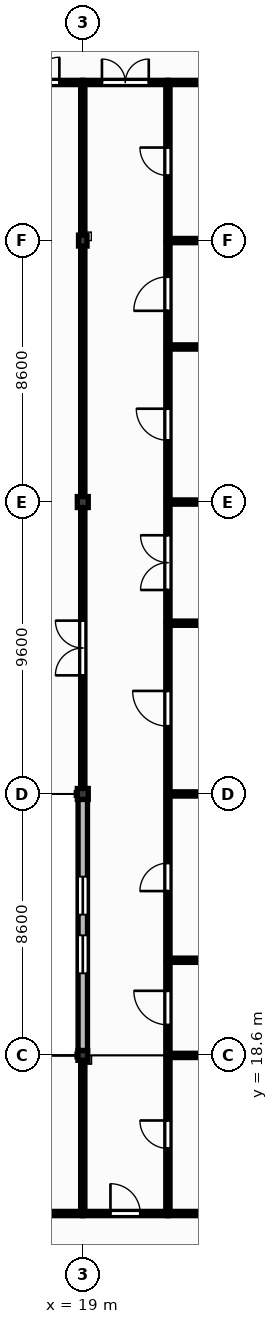
"""IFC4 building model, lengths in metres.
Left out: names, types, materials, properties, quantities, classifications, styles, units other than length and angle.
Written with IfcOpenShell. Run it as: python <this file> out.ifc"""

import sys

from ifc_helpers import new_model, si_unit, direction, frame, frame_2d, origin, origin_2d, place, context, subcontext, project, spatial, rectangle, extrude, element, fill, save


model = new_model("IFC4")
c1 = context("Model", 3, precision=1e-05, world=origin(), true_north=direction((0.0, 1.0)))
c2 = subcontext(c1, "Body", "Model", "MODEL_VIEW")
j1 = project(units=[si_unit("LENGTHUNIT", "METRE"), si_unit("PLANEANGLEUNIT", "RADIAN")], contexts=[c1])
p1 = place(None, origin())
s1 = spatial("IfcSite", under=j1, at=p1, CompositionType="ELEMENT")
p2 = place(p1, origin())
s2 = spatial("IfcBuilding", under=s1, at=p2, CompositionType="ELEMENT")
p3 = place(p2, frame((0.0, 0.0, 9.0)))
s3 = spatial("IfcBuildingStorey", under=s2, at=p3, CompositionType="ELEMENT", Elevation=9.0)
p4 = place(p3, frame((19.0, 18.6, 0.0), z_axis=(0.0, 0.0, 1.0), x_axis=(1.0, 0.0, 0.0)))
e1 = element("IfcColumn", 1, at=p4, inside=s3, PredefinedType="COLUMN", context=c2, shape_type="SweptSolid", body=[
    extrude(rectangle(XDim=0.32, YDim=0.32, at=origin_2d()), origin(), (0.0, 0.0, 1.0), 3.95),
])
for number, where, z_axis, x_axis in (
    (2, (19.0, 27.2, 0.0), (0.0, 0.0, 1.0), (1.0, 0.0, 0.0)),
    (3, (19.0, 36.8, 0.0), (0.0, 0.0, 1.0), (1.0, 0.0, 0.0)),
):
    element("IfcColumn", number, at=place(p3, frame(where, z_axis=z_axis, x_axis=x_axis)), inside=s3, PredefinedType="COLUMN", context=c2, shape_type="SweptSolid", body=[
        extrude(rectangle(XDim=0.36, YDim=0.36, at=origin_2d()), origin(), (0.0, 0.0, 1.0), 3.95),
    ])
p5 = place(p3, frame((19.0, 45.4, 0.0), z_axis=(0.0, 0.0, 1.0), x_axis=(1.0, 0.0, 0.0)))
e4 = element("IfcColumn", 4, at=p5, inside=s3, PredefinedType="COLUMN", context=c2, shape_type="SweptSolid", body=[
    extrude(rectangle(XDim=0.28, YDim=0.36, at=origin_2d()), origin(), (0.0, 0.0, 1.0), 3.95),
])
p6 = place(p3, frame((19.0, 18.76, 0.0), z_axis=(0.0, 0.0, 1.0), x_axis=(0.0, 1.0, 0.0)))
e5 = element("IfcWall", 5, at=p6, inside=s3, PredefinedType="SOLIDWALL", context=c2, shape_type="SweptSolid", body=[
    extrude(rectangle(XDim=8.26, YDim=0.31, at=frame_2d((4.13, 0.0))), origin(), (0.0, 0.0, 1.0), 3.49),
])
p7 = place(p6, frame((2.54, 0.0, 1.35)))
e6 = element("IfcOpeningElement", 6, at=p7, cuts=e5, PredefinedType="OPENING", context=c2, shape_type="SweptSolid", body=[
    extrude(rectangle(XDim=1.25, YDim=1.4, at=frame_2d((0.625, 0.7))), frame((0.0, 0.165, 0.0), z_axis=(0.0, -1.0, 0.0), x_axis=(1.0, 0.0, 0.0)), (0.0, 0.0, 1.0), 0.33),
])
p8 = place(p6, frame((4.47, 0.0, 1.35)))
e7 = element("IfcOpeningElement", 7, at=p8, cuts=e5, PredefinedType="OPENING", context=c2, shape_type="SweptSolid", body=[
    extrude(rectangle(XDim=1.25, YDim=1.4, at=frame_2d((0.625, 0.7))), frame((0.0, 0.165, 0.0), z_axis=(0.0, -1.0, 0.0), x_axis=(1.0, 0.0, 0.0)), (0.0, 0.0, 1.0), 0.33),
])
p9 = place(p3, frame((15.033, 13.4, 0.0), z_axis=(0.0, 0.0, 1.0), x_axis=(1.0, 0.0, 0.0)))
e8 = element("IfcWall", 8, at=p9, inside=s3, PredefinedType="PARTITIONING", context=c2, shape_type="SweptSolid", body=[
    extrude(rectangle(XDim=3.967, YDim=0.14, at=frame_2d((1.983, 0.0))), origin(), (0.0, 0.0, 1.0), 3.91),
])
p10 = place(p9, frame((1.083, 0.0, 0.0)))
e9 = element("IfcOpeningElement", 9, at=p10, cuts=e8, PredefinedType="OPENING", context=c2, shape_type="SweptSolid", body=[
    extrude(rectangle(XDim=1.8, YDim=2.3, at=frame_2d((0.9, 1.15))), frame((0.0, 0.08, 0.0), z_axis=(0.0, -1.0, 0.0), x_axis=(1.0, 0.0, 0.0)), (0.0, 0.0, 1.0), 0.16),
])
p11 = place(p3, frame((15.8, 50.6, 0.0), z_axis=(0.0, 0.0, 1.0), x_axis=(1.0, 0.0, 0.0)))
e10 = element("IfcWall", 10, at=p11, inside=s3, PredefinedType="PARTITIONING", context=c2, shape_type="SweptSolid", body=[
    extrude(rectangle(XDim=3.2, YDim=0.14, at=frame_2d((1.6, 0.0))), origin(), (0.0, 0.0, 1.0), 3.96),
])
p12 = place(p11, frame((0.77, 0.0, 0.0)))
e11 = element("IfcOpeningElement", 11, at=p12, cuts=e10, PredefinedType="OPENING", context=c2, shape_type="SweptSolid", body=[
    extrude(rectangle(XDim=1.66, YDim=2.3, at=frame_2d((0.83, 1.15))), frame((0.0, 0.08, 0.0), z_axis=(0.0, -1.0, 0.0), x_axis=(1.0, 0.0, 0.0)), (0.0, 0.0, 1.0), 0.16),
])
p13 = place(p3, frame((19.0, 13.47, 0.0), z_axis=(0.0, 0.0, 1.0), x_axis=(0.0, 1.0, 0.0)))
e12 = element("IfcWall", 12, at=p13, inside=s3, PredefinedType="PARTITIONING", context=c2, shape_type="SweptSolid", body=[
    extrude(rectangle(XDim=4.97, YDim=0.14, at=frame_2d((2.485, 0.0))), origin(), (0.0, 0.0, 1.0), 3.49),
])
p14 = place(p3, frame((19.0, 13.4, 0.0), z_axis=(0.0, 0.0, 1.0), x_axis=(1.0, 0.0, 0.0)))
e13 = element("IfcWall", 13, at=p14, inside=s3, PredefinedType="PARTITIONING", context=c2, shape_type="SweptSolid", body=[
    extrude(rectangle(XDim=2.8, YDim=0.14, at=frame_2d((1.4, 0.0))), origin(), (0.0, 0.0, 1.0), 3.96),
])
p15 = place(p14, frame((0.91, 0.0, 0.0)))
e14 = element("IfcOpeningElement", 14, at=p15, cuts=e13, PredefinedType="OPENING", context=c2, shape_type="SweptSolid", body=[
    extrude(rectangle(XDim=0.98, YDim=2.15, at=frame_2d((0.49, 1.075))), frame((0.0, 0.08, 0.0), z_axis=(0.0, -1.0, 0.0), x_axis=(1.0, 0.0, 0.0)), (0.0, 0.0, 1.0), 0.16),
])
p16 = place(p3, frame((19.0, 27.38, 0.0), z_axis=(0.0, 0.0, 1.0), x_axis=(0.0, 1.0, 0.0)))
e15 = element("IfcWall", 15, at=p16, inside=s3, PredefinedType="PARTITIONING", context=c2, shape_type="SweptSolid", body=[
    extrude(rectangle(XDim=9.24, YDim=0.14, at=frame_2d((4.62, 0.0))), origin(), (0.0, 0.0, 1.0), 3.49),
])
p17 = place(p16, frame((3.72, 0.0, 0.0)))
e16 = element("IfcOpeningElement", 16, at=p17, cuts=e15, PredefinedType="OPENING", context=c2, shape_type="SweptSolid", body=[
    extrude(rectangle(XDim=1.8, YDim=2.3, at=frame_2d((0.9, 1.15))), frame((0.0, 0.08, 0.0), z_axis=(0.0, -1.0, 0.0), x_axis=(1.0, 0.0, 0.0)), (0.0, 0.0, 1.0), 0.16),
])
p18 = place(p3, frame((19.0, 36.98, 0.0), z_axis=(0.0, 0.0, 1.0), x_axis=(0.0, 1.0, 0.0)))
e17 = element("IfcWall", 17, at=p18, inside=s3, PredefinedType="PARTITIONING", context=c2, shape_type="SweptSolid", body=[
    extrude(rectangle(XDim=8.24, YDim=0.14, at=frame_2d((4.12, 0.0))), origin(), (0.0, 0.0, 1.0), 3.49),
])
p19 = place(p3, frame((19.0, 45.58, 0.0), z_axis=(0.0, 0.0, 1.0), x_axis=(0.0, 1.0, 0.0)))
e18 = element("IfcWall", 18, at=p19, inside=s3, PredefinedType="PARTITIONING", context=c2, shape_type="SweptSolid", body=[
    extrude(rectangle(XDim=4.95, YDim=0.14, at=frame_2d((2.475, 0.0))), origin(), (0.0, 0.0, 1.0), 3.43),
])
p20 = place(p3, frame((19.0, 50.6, 0.0), z_axis=(0.0, 0.0, 1.0), x_axis=(1.0, 0.0, 0.0)))
e19 = element("IfcWall", 19, at=p20, inside=s3, PredefinedType="PARTITIONING", context=c2, shape_type="SweptSolid", body=[
    extrude(rectangle(XDim=2.8, YDim=0.14, at=frame_2d((1.4, 0.0))), origin(), (0.0, 0.0, 1.0), 3.96),
])
p21 = place(p20, frame((0.63, 0.0, 0.0)))
e20 = element("IfcOpeningElement", 20, at=p21, cuts=e19, PredefinedType="OPENING", context=c2, shape_type="SweptSolid", body=[
    extrude(rectangle(XDim=1.54, YDim=2.25, at=frame_2d((0.77, 1.125))), frame((0.0, 0.08, 0.0), z_axis=(0.0, -1.0, 0.0), x_axis=(1.0, 0.0, 0.0)), (0.0, 0.0, 1.0), 0.16),
])
p22 = place(p3, frame((21.8, 13.47, 0.0), z_axis=(0.0, 0.0, 1.0), x_axis=(0.0, 1.0, 0.0)))
e21 = element("IfcWall", 21, at=p22, inside=s3, PredefinedType="PARTITIONING", context=c2, shape_type="SweptSolid", body=[
    extrude(rectangle(XDim=5.06, YDim=0.14, at=frame_2d((2.53, 0.0))), origin(), (0.0, 0.0, 1.0), 3.91),
])
p23 = place(p22, frame((2.07, 0.0, 0.0)))
e22 = element("IfcOpeningElement", 22, at=p23, cuts=e21, PredefinedType="OPENING", context=c2, shape_type="SweptSolid", body=[
    extrude(rectangle(XDim=0.92, YDim=2.1, at=frame_2d((0.46, 1.05))), frame((0.0, 0.08, 0.0), z_axis=(0.0, -1.0, 0.0), x_axis=(1.0, 0.0, 0.0)), (0.0, 0.0, 1.0), 0.16),
])
p24 = place(p3, frame((21.8, 13.4, 0.0), z_axis=(0.0, 0.0, 1.0), x_axis=(1.0, 0.0, 0.0)))
e23 = element("IfcWall", 23, at=p24, inside=s3, PredefinedType="PARTITIONING", context=c2, shape_type="SweptSolid", body=[
    extrude(rectangle(XDim=4.4, YDim=0.14, at=frame_2d((2.2, 0.0))), origin(), (0.0, 0.0, 1.0), 3.91),
])
p25 = place(p3, frame((21.8, 18.67, 0.0), z_axis=(0.0, 0.0, 1.0), x_axis=(0.0, 1.0, 0.0)))
e24 = element("IfcWall", 24, at=p25, inside=s3, PredefinedType="PARTITIONING", context=c2, shape_type="SweptSolid", body=[
    extrude(rectangle(XDim=2.99, YDim=0.14, at=frame_2d((1.495, 0.0))), origin(), (0.0, 0.0, 1.0), 3.96),
])
p26 = place(p25, frame((0.935, 0.0, 0.0)))
e25 = element("IfcOpeningElement", 25, at=p26, cuts=e24, PredefinedType="OPENING", context=c2, shape_type="SweptSolid", body=[
    extrude(rectangle(XDim=1.12, YDim=2.15, at=frame_2d((0.56, 1.075))), frame((0.0, 0.08, 0.0), z_axis=(0.0, -1.0, 0.0), x_axis=(1.0, 0.0, 0.0)), (0.0, 0.0, 1.0), 0.16),
])
p27 = place(p3, frame((21.8, 18.6, 0.0), z_axis=(0.0, 0.0, 1.0), x_axis=(1.0, 0.0, 0.0)))
e26 = element("IfcWall", 26, at=p27, inside=s3, PredefinedType="PARTITIONING", context=c2, shape_type="SweptSolid", body=[
    extrude(rectangle(XDim=4.26, YDim=0.14, at=frame_2d((2.13, 0.0))), origin(), (0.0, 0.0, 1.0), 3.49),
])
p28 = place(p3, frame((21.8, 21.8, 0.0), z_axis=(0.0, 0.0, 1.0), x_axis=(0.0, 1.0, 0.0)))
e27 = element("IfcWall", 27, at=p28, inside=s3, PredefinedType="PARTITIONING", context=c2, shape_type="SweptSolid", body=[
    extrude(rectangle(XDim=5.33, YDim=0.14, at=frame_2d((2.665, 0.0))), origin(), (0.0, 0.0, 1.0), 3.96),
])
p29 = place(p28, frame((2.205, 0.0, 0.0)))
e28 = element("IfcOpeningElement", 28, at=p29, cuts=e27, PredefinedType="OPENING", context=c2, shape_type="SweptSolid", body=[
    extrude(rectangle(XDim=0.92, YDim=2.1, at=frame_2d((0.46, 1.05))), frame((0.0, 0.08, 0.0), z_axis=(0.0, -1.0, 0.0), x_axis=(1.0, 0.0, 0.0)), (0.0, 0.0, 1.0), 0.16),
])
p30 = place(p3, frame((21.8, 21.73, 0.0), z_axis=(0.0, 0.0, 1.0), x_axis=(1.0, 0.0, 0.0)))
e29 = element("IfcWall", 29, at=p30, inside=s3, PredefinedType="PARTITIONING", context=c2, shape_type="SweptSolid", body=[
    extrude(rectangle(XDim=4.4, YDim=0.14, at=frame_2d((2.2, 0.0))), origin(), (0.0, 0.0, 1.0), 3.96),
])
p31 = place(p3, frame((21.8, 27.27, 0.0), z_axis=(0.0, 0.0, 1.0), x_axis=(0.0, 1.0, 0.0)))
e30 = element("IfcWall", 30, at=p31, inside=s3, PredefinedType="PARTITIONING", context=c2, shape_type="SweptSolid", body=[
    extrude(rectangle(XDim=5.476, YDim=0.14, at=frame_2d((2.738, 0.0))), origin(), (0.0, 0.0, 1.0), 3.96),
])
p32 = place(p31, frame((2.158, 0.0, 0.0)))
e31 = element("IfcOpeningElement", 31, at=p32, cuts=e30, PredefinedType="OPENING", context=c2, shape_type="SweptSolid", body=[
    extrude(rectangle(XDim=1.16, YDim=2.1, at=frame_2d((0.58, 1.05))), frame((0.0, 0.08, 0.0), z_axis=(0.0, -1.0, 0.0), x_axis=(1.0, 0.0, 0.0)), (0.0, 0.0, 1.0), 0.16),
])
p33 = place(p3, frame((21.8, 27.2, 0.0), z_axis=(0.0, 0.0, 1.0), x_axis=(1.0, 0.0, 0.0)))
e32 = element("IfcWall", 32, at=p33, inside=s3, PredefinedType="PARTITIONING", context=c2, shape_type="SweptSolid", body=[
    extrude(rectangle(XDim=4.22, YDim=0.14, at=frame_2d((2.11, 0.0))), origin(), (0.0, 0.0, 1.0), 3.49),
])
p34 = place(p3, frame((21.8, 32.886, 0.0), z_axis=(0.0, 0.0, 1.0), x_axis=(0.0, 1.0, 0.0)))
e33 = element("IfcWall", 33, at=p34, inside=s3, PredefinedType="PARTITIONING", context=c2, shape_type="SweptSolid", body=[
    extrude(rectangle(XDim=3.844, YDim=0.14, at=frame_2d((1.922, 0.0))), origin(), (0.0, 0.0, 1.0), 3.96),
])
p35 = place(p34, frame((1.022, 0.0, 0.0)))
e34 = element("IfcOpeningElement", 34, at=p35, cuts=e33, PredefinedType="OPENING", context=c2, shape_type="SweptSolid", body=[
    extrude(rectangle(XDim=1.8, YDim=2.3, at=frame_2d((0.9, 1.15))), frame((0.0, 0.08, 0.0), z_axis=(0.0, -1.0, 0.0), x_axis=(1.0, 0.0, 0.0)), (0.0, 0.0, 1.0), 0.16),
])
p36 = place(p3, frame((21.8, 32.816, 0.0), z_axis=(0.0, 0.0, 1.0), x_axis=(1.0, 0.0, 0.0)))
e35 = element("IfcWall", 35, at=p36, inside=s3, PredefinedType="PARTITIONING", context=c2, shape_type="SweptSolid", body=[
    extrude(rectangle(XDim=4.4, YDim=0.14, at=frame_2d((2.2, 0.0))), origin(), (0.0, 0.0, 1.0), 3.96),
])
p37 = place(p3, frame((21.8, 36.87, 0.0), z_axis=(0.0, 0.0, 1.0), x_axis=(0.0, 1.0, 0.0)))
e36 = element("IfcWall", 36, at=p37, inside=s3, PredefinedType="PARTITIONING", context=c2, shape_type="SweptSolid", body=[
    extrude(rectangle(XDim=4.96, YDim=0.14, at=frame_2d((2.48, 0.0))), origin(), (0.0, 0.0, 1.0), 3.96),
])
p38 = place(p37, frame((1.96, 0.0, 0.0)))
e37 = element("IfcOpeningElement", 37, at=p38, cuts=e36, PredefinedType="OPENING", context=c2, shape_type="SweptSolid", body=[
    extrude(rectangle(XDim=1.04, YDim=2.1, at=frame_2d((0.52, 1.05))), frame((0.0, 0.08, 0.0), z_axis=(0.0, -1.0, 0.0), x_axis=(1.0, 0.0, 0.0)), (0.0, 0.0, 1.0), 0.16),
])
p39 = place(p3, frame((21.8, 36.8, 0.0), z_axis=(0.0, 0.0, 1.0), x_axis=(1.0, 0.0, 0.0)))
e38 = element("IfcWall", 38, at=p39, inside=s3, PredefinedType="PARTITIONING", context=c2, shape_type="SweptSolid", body=[
    extrude(rectangle(XDim=4.22, YDim=0.14, at=frame_2d((2.11, 0.0))), origin(), (0.0, 0.0, 1.0), 3.49),
])
p40 = place(p3, frame((21.8, 41.97, 0.0), z_axis=(0.0, 0.0, 1.0), x_axis=(0.0, 1.0, 0.0)))
e39 = element("IfcWall", 39, at=p40, inside=s3, PredefinedType="PARTITIONING", context=c2, shape_type="SweptSolid", body=[
    extrude(rectangle(XDim=3.36, YDim=0.14, at=frame_2d((1.68, 0.0))), origin(), (0.0, 0.0, 1.0), 3.96),
])
p41 = place(p40, frame((1.12, 0.0, 0.0)))
e40 = element("IfcOpeningElement", 40, at=p41, cuts=e39, PredefinedType="OPENING", context=c2, shape_type="SweptSolid", body=[
    extrude(rectangle(XDim=1.12, YDim=2.15, at=frame_2d((0.56, 1.075))), frame((0.0, 0.08, 0.0), z_axis=(0.0, -1.0, 0.0), x_axis=(1.0, 0.0, 0.0)), (0.0, 0.0, 1.0), 0.16),
])
p42 = place(p3, frame((21.8, 41.9, 0.0), z_axis=(0.0, 0.0, 1.0), x_axis=(1.0, 0.0, 0.0)))
e41 = element("IfcWall", 41, at=p42, inside=s3, PredefinedType="PARTITIONING", context=c2, shape_type="SweptSolid", body=[
    extrude(rectangle(XDim=4.4, YDim=0.14, at=frame_2d((2.2, 0.0))), origin(), (0.0, 0.0, 1.0), 3.96),
])
p43 = place(p3, frame((21.8, 45.47, 0.0), z_axis=(0.0, 0.0, 1.0), x_axis=(0.0, 1.0, 0.0)))
e42 = element("IfcWall", 42, at=p43, inside=s3, PredefinedType="PARTITIONING", context=c2, shape_type="SweptSolid", body=[
    extrude(rectangle(XDim=5.06, YDim=0.14, at=frame_2d((2.53, 0.0))), origin(), (0.0, 0.0, 1.0), 3.96),
])
p44 = place(p43, frame((2.07, 0.0, 0.0)))
e43 = element("IfcOpeningElement", 43, at=p44, cuts=e42, PredefinedType="OPENING", context=c2, shape_type="SweptSolid", body=[
    extrude(rectangle(XDim=0.92, YDim=2.1, at=frame_2d((0.46, 1.05))), frame((0.0, 0.08, 0.0), z_axis=(0.0, -1.0, 0.0), x_axis=(1.0, 0.0, 0.0)), (0.0, 0.0, 1.0), 0.16),
])
p45 = place(p3, frame((21.8, 45.4, 0.0), z_axis=(0.0, 0.0, 1.0), x_axis=(1.0, 0.0, 0.0)))
e44 = element("IfcWall", 44, at=p45, inside=s3, PredefinedType="PARTITIONING", context=c2, shape_type="SweptSolid", body=[
    extrude(rectangle(XDim=4.24, YDim=0.14, at=frame_2d((2.12, 0.0))), origin(), (0.0, 0.0, 1.0), 3.49),
])
p46 = place(p3, frame((21.8, 50.6, 0.0), z_axis=(0.0, 0.0, 1.0), x_axis=(1.0, 0.0, 0.0)))
e45 = element("IfcWall", 45, at=p46, inside=s3, PredefinedType="PARTITIONING", context=c2, shape_type="SweptSolid", body=[
    extrude(rectangle(XDim=4.4, YDim=0.14, at=frame_2d((2.2, 0.0))), origin(), (0.0, 0.0, 1.0), 3.96),
])
p47 = place(p7, origin())
e46 = element("IfcWindow", 46, at=p47, inside=s3, PartitioningType="SINGLE_PANEL", PredefinedType="WINDOW", context=c2, shape_type="SweptSolid", body=[
    extrude(rectangle(XDim=1.25, YDim=1.4, at=frame_2d((0.625, 0.7))), frame((0.0, 0.03, 0.0), z_axis=(0.0, -1.0, 0.0), x_axis=(1.0, 0.0, 0.0)), (0.0, 0.0, 1.0), 0.06),
])
fill(e6, e46)
p48 = place(p8, origin())
e47 = element("IfcWindow", 47, at=p48, inside=s3, PartitioningType="SINGLE_PANEL", PredefinedType="WINDOW", context=c2, shape_type="SweptSolid", body=[
    extrude(rectangle(XDim=1.25, YDim=1.4, at=frame_2d((0.625, 0.7))), frame((0.0, 0.03, 0.0), z_axis=(0.0, -1.0, 0.0), x_axis=(1.0, 0.0, 0.0)), (0.0, 0.0, 1.0), 0.06),
])
fill(e7, e47)
p49 = place(p12, origin())
e48 = element("IfcDoor", 48, at=p49, inside=s3, OperationType="DOUBLE_DOOR_SINGLE_SWING", PredefinedType="DOOR", context=c2, shape_type="SweptSolid", body=[
    extrude(rectangle(XDim=1.66, YDim=2.3, at=frame_2d((0.83, 1.15))), frame((0.0, 0.025, 0.0), z_axis=(0.0, -1.0, 0.0), x_axis=(1.0, 0.0, 0.0)), (0.0, 0.0, 1.0), 0.05),
])
fill(e11, e48)
p50 = place(p21, origin())
e49 = element("IfcDoor", 49, at=p50, inside=s3, OperationType="DOUBLE_DOOR_SINGLE_SWING", PredefinedType="DOOR", context=c2, shape_type="SweptSolid", body=[
    extrude(rectangle(XDim=1.54, YDim=2.25, at=frame_2d((0.77, 1.125))), frame((0.0, 0.025, 0.0), z_axis=(0.0, -1.0, 0.0), x_axis=(1.0, 0.0, 0.0)), (0.0, 0.0, 1.0), 0.05),
])
fill(e20, e49)
p51 = place(p17, origin())
e50 = element("IfcDoor", 50, at=p51, inside=s3, OperationType="DOUBLE_DOOR_SINGLE_SWING", PredefinedType="DOOR", context=c2, shape_type="SweptSolid", body=[
    extrude(rectangle(XDim=1.8, YDim=2.3, at=frame_2d((0.9, 1.15))), frame((0.0, 0.025, 0.0), z_axis=(0.0, -1.0, 0.0), x_axis=(1.0, 0.0, 0.0)), (0.0, 0.0, 1.0), 0.05),
])
fill(e16, e50)
p52 = place(p15, origin())
e51 = element("IfcDoor", 51, at=p52, inside=s3, OperationType="SINGLE_SWING_LEFT", PredefinedType="DOOR", context=c2, shape_type="SweptSolid", body=[
    extrude(rectangle(XDim=0.98, YDim=2.15, at=frame_2d((0.49, 1.075))), frame((0.0, 0.025, 0.0), z_axis=(0.0, -1.0, 0.0), x_axis=(1.0, 0.0, 0.0)), (0.0, 0.0, 1.0), 0.05),
])
fill(e14, e51)
p53 = place(p26, origin())
e52 = element("IfcDoor", 52, at=p53, inside=s3, OperationType="SINGLE_SWING_RIGHT", PredefinedType="DOOR", context=c2, shape_type="SweptSolid", body=[
    extrude(rectangle(XDim=1.12, YDim=2.15, at=frame_2d((0.56, 1.075))), frame((0.0, 0.025, 0.0), z_axis=(0.0, -1.0, 0.0), x_axis=(1.0, 0.0, 0.0)), (0.0, 0.0, 1.0), 0.05),
])
fill(e25, e52)
p54 = place(p29, origin())
e53 = element("IfcDoor", 53, at=p54, inside=s3, OperationType="SINGLE_SWING_LEFT", PredefinedType="DOOR", context=c2, shape_type="SweptSolid", body=[
    extrude(rectangle(XDim=0.92, YDim=2.1, at=frame_2d((0.46, 1.05))), frame((0.0, 0.025, 0.0), z_axis=(0.0, -1.0, 0.0), x_axis=(1.0, 0.0, 0.0)), (0.0, 0.0, 1.0), 0.05),
])
fill(e28, e53)
p55 = place(p32, origin())
e54 = element("IfcDoor", 54, at=p55, inside=s3, OperationType="SINGLE_SWING_RIGHT", PredefinedType="DOOR", context=c2, shape_type="SweptSolid", body=[
    extrude(rectangle(XDim=1.16, YDim=2.1, at=frame_2d((0.58, 1.05))), frame((0.0, 0.025, 0.0), z_axis=(0.0, -1.0, 0.0), x_axis=(1.0, 0.0, 0.0)), (0.0, 0.0, 1.0), 0.05),
])
fill(e31, e54)
p56 = place(p35, origin())
e55 = element("IfcDoor", 55, at=p56, inside=s3, OperationType="DOUBLE_DOOR_SINGLE_SWING", PredefinedType="DOOR", context=c2, shape_type="SweptSolid", body=[
    extrude(rectangle(XDim=1.8, YDim=2.3, at=frame_2d((0.9, 1.15))), frame((0.0, 0.025, 0.0), z_axis=(0.0, -1.0, 0.0), x_axis=(1.0, 0.0, 0.0)), (0.0, 0.0, 1.0), 0.05),
])
fill(e34, e55)
p57 = place(p38, origin())
e56 = element("IfcDoor", 56, at=p57, inside=s3, OperationType="SINGLE_SWING_RIGHT", PredefinedType="DOOR", context=c2, shape_type="SweptSolid", body=[
    extrude(rectangle(XDim=1.04, YDim=2.1, at=frame_2d((0.52, 1.05))), frame((0.0, 0.025, 0.0), z_axis=(0.0, -1.0, 0.0), x_axis=(1.0, 0.0, 0.0)), (0.0, 0.0, 1.0), 0.05),
])
fill(e37, e56)
p58 = place(p41, origin())
e57 = element("IfcDoor", 57, at=p58, inside=s3, OperationType="SINGLE_SWING_LEFT", PredefinedType="DOOR", context=c2, shape_type="SweptSolid", body=[
    extrude(rectangle(XDim=1.12, YDim=2.15, at=frame_2d((0.56, 1.075))), frame((0.0, 0.025, 0.0), z_axis=(0.0, -1.0, 0.0), x_axis=(1.0, 0.0, 0.0)), (0.0, 0.0, 1.0), 0.05),
])
fill(e40, e57)
p59 = place(p44, origin())
e58 = element("IfcDoor", 58, at=p59, inside=s3, OperationType="SINGLE_SWING_RIGHT", PredefinedType="DOOR", context=c2, shape_type="SweptSolid", body=[
    extrude(rectangle(XDim=0.92, YDim=2.1, at=frame_2d((0.46, 1.05))), frame((0.0, 0.025, 0.0), z_axis=(0.0, -1.0, 0.0), x_axis=(1.0, 0.0, 0.0)), (0.0, 0.0, 1.0), 0.05),
])
fill(e43, e58)
p60 = place(p23, origin())
e59 = element("IfcDoor", 59, at=p60, inside=s3, OperationType="SINGLE_SWING_RIGHT", PredefinedType="DOOR", context=c2, shape_type="SweptSolid", body=[
    extrude(rectangle(XDim=0.92, YDim=2.1, at=frame_2d((0.46, 1.05))), frame((0.0, 0.025, 0.0), z_axis=(0.0, -1.0, 0.0), x_axis=(1.0, 0.0, 0.0)), (0.0, 0.0, 1.0), 0.05),
])
fill(e22, e59)
save(model, sys.argv[1])
